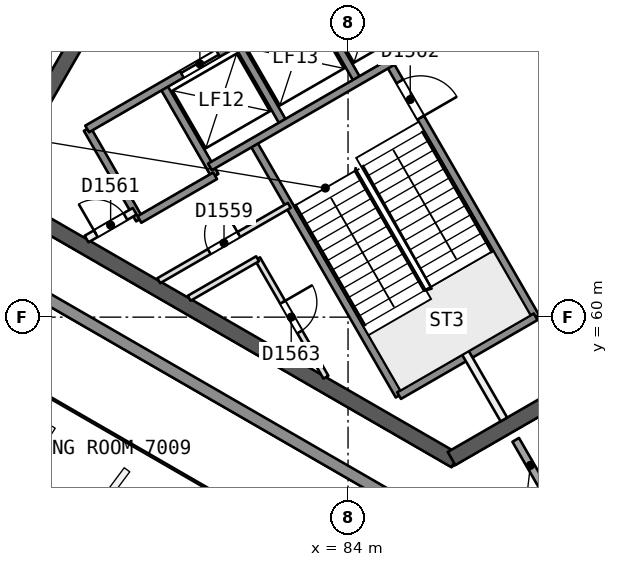
"""IFC4 building model, lengths in metres.
Left out: names, types, materials, properties, quantities, classifications, styles, units other than length and angle.
Written with IfcOpenShell. Run it as: python <this file> out.ifc"""

import sys

from ifc_helpers import new_model, si_unit, direction, frame, frame_2d, origin, place, context, subcontext, project, spatial, rectangle, extrude, element, fill, save


model = new_model("IFC4")
c1 = context("Model", 3, precision=1e-05, world=origin(), true_north=direction((0.0, 1.0)))
c2 = subcontext(c1, "Body", "Model", "MODEL_VIEW")
j1 = project(units=[si_unit("LENGTHUNIT", "METRE"), si_unit("PLANEANGLEUNIT", "RADIAN")], contexts=[c1])
p1 = place(None, origin())
s1 = spatial("IfcSite", under=j1, at=p1, CompositionType="ELEMENT")
p2 = place(p1, origin())
s2 = spatial("IfcBuilding", under=s1, at=p2, CompositionType="ELEMENT")
p3 = place(p2, frame((0.0, 0.0, 284.9)))
s3 = spatial("IfcBuildingStorey", under=s2, at=p3, CompositionType="ELEMENT", Elevation=284.9)
p4 = place(p3, frame((79.615, 72.006, 0.0), z_axis=(0.0, 0.0, 1.0), x_axis=(-0.50000177223, -0.866024380585, 0.0)))
e1 = element("IfcWall", 1, at=p4, inside=s3, PredefinedType="SHEAR", context=c2, shape_type="SweptSolid", body=[
    extrude(rectangle(XDim=10.265, YDim=0.4, at=frame_2d((5.132, 0.0))), origin(), (0.0, 0.0, 1.0), 3.7),
])
p5 = place(p4, frame((0.834, 0.0, 0.0)))
e2 = element("IfcOpeningElement", 2, at=p5, cuts=e1, PredefinedType="OPENING", context=c2, shape_type="SweptSolid", body=[
    extrude(rectangle(XDim=1.2, YDim=2.1, at=frame_2d((0.6, 1.05))), frame((0.0, 0.21, 0.0), z_axis=(0.0, -1.0, 0.0), x_axis=(1.0, 0.0, 0.0)), (0.0, 0.0, 1.0), 0.421),
])
p6 = place(p3, frame((74.583, 63.29, 0.0), z_axis=(0.0, 0.0, 1.0), x_axis=(0.866024494188, -0.500001575463, 0.0)))
e3 = element("IfcWall", 3, at=p6, inside=s3, PredefinedType="SHEAR", context=c2, shape_type="SweptSolid", body=[
    extrude(rectangle(XDim=14.133, YDim=0.4, at=frame_2d((7.067, 0.0))), origin(), (0.0, 0.0, 1.0), 3.7),
])
p7 = place(p3, frame((86.723, 56.281, 0.0), z_axis=(0.0, 0.0, 1.0), x_axis=(0.866025485263, 0.499999858875, 0.0)))
e4 = element("IfcWall", 4, at=p7, inside=s3, PredefinedType="SHEAR", context=c2, shape_type="SweptSolid", body=[
    extrude(rectangle(XDim=3.53, YDim=0.4, at=frame_2d((1.765, 0.0))), origin(), (0.0, 0.0, 1.0), 3.7),
])
p8 = place(p3, frame((88.412, 56.771, 0.0), z_axis=(0.0, 0.0, 1.0), x_axis=(0.500072711917, -0.86598341947, 0.0)))
e5 = element("IfcWall", 5, at=p8, inside=s3, PredefinedType="PARTITIONING", context=c2, shape_type="SweptSolid", body=[
    extrude(rectangle(XDim=1.549, YDim=0.2, at=frame_2d((0.774, 0.0))), origin(), (0.0, 0.0, 1.0), 3.3),
])
p9 = place(p3, frame((91.354, 56.485, 0.0), z_axis=(0.0, 0.0, 1.0), x_axis=(-0.866023315909, -0.500003616288, 0.0)))
e6 = element("IfcWall", 6, at=p9, inside=s3, PredefinedType="SOLIDWALL", context=c2, shape_type="SweptSolid", body=[
    extrude(rectangle(XDim=4.811, YDim=0.3, at=frame_2d((2.405, 0.0))), origin(), (0.0, 0.0, 1.0), 3.3),
])
p10 = place(p9, frame((0.259, 0.0, 0.9)))
e7 = element("IfcOpeningElement", 7, at=p10, cuts=e6, PredefinedType="OPENING", context=c2, shape_type="SweptSolid", body=[
    extrude(rectangle(XDim=1.8, YDim=1.5, at=frame_2d((0.9, 0.75))), frame((0.0, 0.161, 0.0), z_axis=(0.0, -1.0, 0.0), x_axis=(1.0, 0.0, 0.0)), (0.0, 0.0, 1.0), 0.321),
])
p11 = place(p3, frame((87.188, 54.08, 0.0), z_axis=(0.0, 0.0, 1.0), x_axis=(-0.866024534676, 0.500001505337, 0.0)))
e8 = element("IfcWall", 8, at=p11, inside=s3, PredefinedType="SOLIDWALL", context=c2, shape_type="SweptSolid", body=[
    extrude(rectangle(XDim=47.03, YDim=0.3, at=frame_2d((23.515, 0.0))), origin(), (0.0, 0.0, 1.0), 3.3),
])
p12 = place(p11, frame((29.392, 0.0, 0.0)))
e9 = element("IfcOpeningElement", 9, at=p12, cuts=e8, PredefinedType="OPENING", context=c2, shape_type="SweptSolid", body=[
    extrude(rectangle(XDim=2.4, YDim=2.4, at=frame_2d((1.2, 1.2))), frame((0.0, 0.161, 0.0), z_axis=(0.0, -1.0, 0.0), x_axis=(1.0, 0.0, 0.0)), (0.0, 0.0, 1.0), 0.321),
])
p13 = place(p11, frame((26.274, 0.0, 0.0)))
e10 = element("IfcOpeningElement", 10, at=p13, cuts=e8, PredefinedType="OPENING", context=c2, shape_type="SweptSolid", body=[
    extrude(rectangle(XDim=2.4, YDim=2.4, at=frame_2d((1.2, 1.2))), frame((0.0, 0.161, 0.0), z_axis=(0.0, -1.0, 0.0), x_axis=(1.0, 0.0, 0.0)), (0.0, 0.0, 1.0), 0.321),
])
p14 = place(p11, frame((16.859, 0.0, 0.0)))
e11 = element("IfcOpeningElement", 11, at=p14, cuts=e8, PredefinedType="OPENING", context=c2, shape_type="SweptSolid", body=[
    extrude(rectangle(XDim=2.4, YDim=2.4, at=frame_2d((1.2, 1.2))), frame((0.0, 0.161, 0.0), z_axis=(0.0, -1.0, 0.0), x_axis=(1.0, 0.0, 0.0)), (0.0, 0.0, 1.0), 0.321),
])
p15 = place(p11, frame((21.536, 0.0, 0.0)))
e12 = element("IfcOpeningElement", 12, at=p15, cuts=e8, PredefinedType="OPENING", context=c2, shape_type="SweptSolid", body=[
    extrude(rectangle(XDim=2.4, YDim=2.4, at=frame_2d((1.2, 1.2))), frame((0.0, 0.161, 0.0), z_axis=(0.0, -1.0, 0.0), x_axis=(1.0, 0.0, 0.0)), (0.0, 0.0, 1.0), 0.321),
])
p16 = place(p3, frame((77.135, 64.952, 0.0), z_axis=(0.0, 0.0, 1.0), x_axis=(0.499996545922, -0.866027397988, 0.0)))
e13 = element("IfcWall", 13, at=p16, inside=s3, PredefinedType="SOLIDWALL", context=c2, shape_type="SweptSolid", body=[
    extrude(rectangle(XDim=2.75, YDim=0.2, at=frame_2d((1.375, 0.0))), origin(), (0.0, 0.0, 1.0), 3.3),
])
p17 = place(p3, frame((81.619, 61.536, 0.0), z_axis=(0.0, 0.0, 1.0), x_axis=(0.499992664208, -0.866029639064, 0.0)))
e14 = element("IfcWall", 14, at=p17, inside=s3, PredefinedType="PARTITIONING", context=c2, shape_type="SweptSolid", body=[
    extrude(rectangle(XDim=3.598, YDim=0.15, at=frame_2d((1.799, 0.0))), origin(), (0.0, 0.0, 1.0), 3.3),
])
p18 = place(p17, frame((1.322, 0.0, 0.0)))
e15 = element("IfcOpeningElement", 15, at=p18, cuts=e14, PredefinedType="OPENING", context=c2, shape_type="SweptSolid", body=[
    extrude(rectangle(XDim=0.9, YDim=2.1, at=frame_2d((0.45, 1.05))), frame((0.0, 0.085, 0.0), z_axis=(0.0, -1.0, 0.0), x_axis=(1.0, 0.0, 0.0)), (0.0, 0.0, 1.0), 0.171),
])
p19 = place(p3, frame((79.127, 66.102, 0.0), z_axis=(0.0, 0.0, 1.0), x_axis=(0.499996545922, -0.866027397988, 0.0)))
e16 = element("IfcWall", 16, at=p19, inside=s3, PredefinedType="SOLIDWALL", context=c2, shape_type="SweptSolid", body=[
    extrude(rectangle(XDim=2.75, YDim=0.2, at=frame_2d((1.375, 0.0))), origin(), (0.0, 0.0, 1.0), 3.3),
])
p20 = place(p3, frame((81.493, 64.604, 0.0), z_axis=(0.0, 0.0, 1.0), x_axis=(0.500006057782, -0.866021906294, 0.0)))
e17 = element("IfcWall", 17, at=p20, inside=s3, PredefinedType="SOLIDWALL", context=c2, shape_type="SweptSolid", body=[
    extrude(rectangle(XDim=7.7, YDim=0.2, at=frame_2d((3.85, 0.0))), origin(), (0.0, 0.0, 1.0), 3.3),
])
p21 = place(p3, frame((81.076, 67.227, 0.0), z_axis=(0.0, 0.0, 1.0), x_axis=(0.50000366821, -0.866023285932, 0.0)))
e18 = element("IfcWall", 18, at=p21, inside=s3, PredefinedType="SOLIDWALL", context=c2, shape_type="SweptSolid", body=[
    extrude(rectangle(XDim=2.48, YDim=0.2, at=frame_2d((1.24, 0.0))), origin(), (0.0, 0.0, 1.0), 3.3),
])
p22 = place(p3, frame((87.09, 59.06, 0.0), z_axis=(0.0, 0.0, 1.0), x_axis=(0.499941815747, -0.866058993873, 0.0)))
e19 = element("IfcWall", 19, at=p22, inside=s3, PredefinedType="PARTITIONING", context=c2, shape_type="SweptSolid", body=[
    extrude(rectangle(XDim=2.023, YDim=0.2, at=frame_2d((1.012, 0.0))), origin(), (0.0, 0.0, 1.0), 3.3),
])
p23 = place(p3, frame((83.024, 68.352, 0.0), z_axis=(0.0, 0.0, 1.0), x_axis=(0.50000366821, -0.866023285932, 0.0)))
e20 = element("IfcWall", 20, at=p23, inside=s3, PredefinedType="SOLIDWALL", context=c2, shape_type="SweptSolid", body=[
    extrude(rectangle(XDim=2.48, YDim=0.2, at=frame_2d((1.24, 0.0))), origin(), (0.0, 0.0, 1.0), 3.3),
])
p24 = place(p3, frame((85.087, 66.679, 0.0), z_axis=(0.0, 0.0, 1.0), x_axis=(0.500019787375, -0.866013979237, 0.0)))
e21 = element("IfcWall", 21, at=p24, inside=s3, PredefinedType="SOLIDWALL", context=c2, shape_type="SweptSolid", body=[
    extrude(rectangle(XDim=7.7, YDim=0.2, at=frame_2d((3.85, 0.0))), origin(), (0.0, 0.0, 1.0), 3.3),
])
p25 = place(p24, frame((0.55, 0.0, 0.0)))
e22 = element("IfcOpeningElement", 22, at=p25, cuts=e21, PredefinedType="OPENING", context=c2, shape_type="SweptSolid", body=[
    extrude(rectangle(XDim=1.1, YDim=2.1, at=frame_2d((0.55, 1.05))), frame((0.0, 0.11, 0.0), z_axis=(0.0, -1.0, 0.0), x_axis=(1.0, 0.0, 0.0)), (0.0, 0.0, 1.0), 0.221),
])
p26 = place(p3, frame((77.135, 64.952, 0.0), z_axis=(0.0, 0.0, 1.0), x_axis=(0.866031916153, 0.499988720078, 0.0)))
e23 = element("IfcWall", 23, at=p26, inside=s3, PredefinedType="SOLIDWALL", context=c2, shape_type="SweptSolid", body=[
    extrude(rectangle(XDim=11.35, YDim=0.2, at=frame_2d((5.675, 0.0))), origin(), (0.0, 0.0, 1.0), 3.3),
])
p27 = place(p26, frame((2.875, 0.0, 0.0)))
e24 = element("IfcOpeningElement", 24, at=p27, cuts=e23, PredefinedType="OPENING", context=c2, shape_type="SweptSolid", body=[
    extrude(rectangle(XDim=1.1, YDim=2.1, at=frame_2d((0.55, 1.05))), frame((0.0, 0.11, 0.0), z_axis=(0.0, -1.0, 0.0), x_axis=(1.0, 0.0, 0.0)), (0.0, 0.0, 1.0), 0.221),
])
p28 = place(p26, frame((5.125, 0.0, 0.0)))
e25 = element("IfcOpeningElement", 25, at=p28, cuts=e23, PredefinedType="OPENING", context=c2, shape_type="SweptSolid", body=[
    extrude(rectangle(XDim=1.1, YDim=2.1, at=frame_2d((0.55, 1.05))), frame((0.0, 0.11, 0.0), z_axis=(0.0, -1.0, 0.0), x_axis=(1.0, 0.0, 0.0)), (0.0, 0.0, 1.0), 0.221),
])
p29 = place(p26, frame((7.375, 0.0, 0.0)))
e26 = element("IfcOpeningElement", 26, at=p29, cuts=e23, PredefinedType="OPENING", context=c2, shape_type="SweptSolid", body=[
    extrude(rectangle(XDim=1.1, YDim=2.1, at=frame_2d((0.55, 1.05))), frame((0.0, 0.11, 0.0), z_axis=(0.0, -1.0, 0.0), x_axis=(1.0, 0.0, 0.0)), (0.0, 0.0, 1.0), 0.221),
])
p30 = place(p3, frame((80.367, 63.954, 0.0), z_axis=(0.0, 0.0, 1.0), x_axis=(0.866026575979, 0.499997969693, 0.0)))
e27 = element("IfcWall", 27, at=p30, inside=s3, PredefinedType="SOLIDWALL", context=c2, shape_type="SweptSolid", body=[
    extrude(rectangle(XDim=6.75, YDim=0.2, at=frame_2d((3.375, 0.0))), origin(), (0.0, 0.0, 1.0), 3.3),
])
p31 = place(p3, frame((77.12, 62.056, 0.0), z_axis=(0.0, 0.0, 1.0), x_axis=(0.866054810376, 0.49994906283, 0.0)))
e28 = element("IfcWall", 28, at=p31, inside=s3, PredefinedType="PARTITIONING", context=c2, shape_type="SweptSolid", body=[
    extrude(rectangle(XDim=1.461, YDim=0.2, at=frame_2d((0.73, 0.0))), origin(), (0.0, 0.0, 1.0), 3.3),
])
p32 = place(p31, frame((0.281, 0.0, 0.0)))
e29 = element("IfcOpeningElement", 29, at=p32, cuts=e28, PredefinedType="OPENING", context=c2, shape_type="SweptSolid", body=[
    extrude(rectangle(XDim=0.9, YDim=2.1, at=frame_2d((0.45, 1.05))), frame((0.0, 0.11, 0.0), z_axis=(0.0, -1.0, 0.0), x_axis=(1.0, 0.0, 0.0)), (0.0, 0.0, 1.0), 0.221),
])
p33 = place(p3, frame((78.51, 62.57, 0.0), z_axis=(0.0, 0.0, 1.0), x_axis=(0.866053019151, 0.499952165731, 0.0)))
e30 = element("IfcWall", 30, at=p33, inside=s3, PredefinedType="SOLIDWALL", context=c2, shape_type="SweptSolid", body=[
    extrude(rectangle(XDim=2.3, YDim=0.2, at=frame_2d((1.15, 0.0))), origin(), (0.0, 0.0, 1.0), 3.3),
])
p34 = place(p3, frame((79.02, 60.959, 0.0), z_axis=(0.0, 0.0, 1.0), x_axis=(0.866028661061, 0.499994358189, 0.0)))
e31 = element("IfcWall", 31, at=p34, inside=s3, PredefinedType="PARTITIONING", context=c2, shape_type="SweptSolid", body=[
    extrude(rectangle(XDim=3.964, YDim=0.15, at=frame_2d((1.982, 0.0))), origin(), (0.0, 0.0, 1.0), 3.3),
])
p35 = place(p34, frame((1.532, 0.0, 0.0)))
e32 = element("IfcOpeningElement", 32, at=p35, cuts=e31, PredefinedType="OPENING", context=c2, shape_type="SweptSolid", body=[
    extrude(rectangle(XDim=0.9, YDim=2.1, at=frame_2d((0.45, 1.05))), frame((0.0, 0.085, 0.0), z_axis=(0.0, -1.0, 0.0), x_axis=(1.0, 0.0, 0.0)), (0.0, 0.0, 1.0), 0.171),
])
p36 = place(p3, frame((79.82, 60.497, 0.0), z_axis=(0.0, 0.0, 1.0), x_axis=(0.866021168401, 0.500007335828, 0.0)))
e33 = element("IfcWall", 33, at=p36, inside=s3, PredefinedType="PARTITIONING", context=c2, shape_type="SweptSolid", body=[
    extrude(rectangle(XDim=2.077, YDim=0.15, at=frame_2d((1.039, 0.0))), origin(), (0.0, 0.0, 1.0), 3.3),
])
p37 = place(p3, frame((85.343, 57.935, 0.0), z_axis=(0.0, 0.0, 1.0), x_axis=(0.866004344652, 0.500036473714, 0.0)))
e34 = element("IfcWall", 34, at=p37, inside=s3, PredefinedType="SOLIDWALL", context=c2, shape_type="SweptSolid", body=[
    extrude(rectangle(XDim=4.15, YDim=0.2, at=frame_2d((2.075, 0.0))), origin(), (0.0, 0.0, 1.0), 3.3),
])
p38 = place(p27, origin())
e35 = element("IfcDoor", 35, at=p38, inside=s3, OperationType="SLIDING_TO_LEFT", PredefinedType="NOTDEFINED", context=c2, shape_type="SweptSolid", body=[
    extrude(rectangle(XDim=1.1, YDim=2.1, at=frame_2d((0.55, 1.05))), frame((0.0, 0.025, 0.0), z_axis=(0.0, -1.0, 0.0), x_axis=(1.0, 0.0, 0.0)), (0.0, 0.0, 1.0), 0.05),
])
fill(e24, e35)
p39 = place(p35, origin())
e36 = element("IfcDoor", 36, at=p39, inside=s3, OperationType="SINGLE_SWING_RIGHT", PredefinedType="NOTDEFINED", context=c2, shape_type="SweptSolid", body=[
    extrude(rectangle(XDim=0.9, YDim=2.1, at=frame_2d((0.45, 1.05))), frame((0.0, 0.025, 0.0), z_axis=(0.0, -1.0, 0.0), x_axis=(1.0, 0.0, 0.0)), (0.0, 0.0, 1.0), 0.05),
])
fill(e32, e36)
p40 = place(p32, origin())
e37 = element("IfcDoor", 37, at=p40, inside=s3, OperationType="SINGLE_SWING_LEFT", PredefinedType="NOTDEFINED", context=c2, shape_type="SweptSolid", body=[
    extrude(rectangle(XDim=0.9, YDim=2.1, at=frame_2d((0.45, 1.05))), frame((0.0, 0.025, 0.0), z_axis=(0.0, -1.0, 0.0), x_axis=(1.0, 0.0, 0.0)), (0.0, 0.0, 1.0), 0.05),
])
fill(e29, e37)
p41 = place(p25, origin())
e38 = element("IfcDoor", 38, at=p41, inside=s3, OperationType="SINGLE_SWING_RIGHT", PredefinedType="NOTDEFINED", context=c2, shape_type="SweptSolid", body=[
    extrude(rectangle(XDim=1.1, YDim=2.1, at=frame_2d((0.55, 1.05))), frame((0.0, 0.025, 0.0), z_axis=(0.0, -1.0, 0.0), x_axis=(1.0, 0.0, 0.0)), (0.0, 0.0, 1.0), 0.05),
])
fill(e22, e38)
p42 = place(p18, origin())
e39 = element("IfcDoor", 39, at=p42, inside=s3, OperationType="SINGLE_SWING_LEFT", PredefinedType="NOTDEFINED", context=c2, shape_type="SweptSolid", body=[
    extrude(rectangle(XDim=0.9, YDim=2.1, at=frame_2d((0.45, 1.05))), frame((0.0, 0.025, 0.0), z_axis=(0.0, -1.0, 0.0), x_axis=(1.0, 0.0, 0.0)), (0.0, 0.0, 1.0), 0.05),
])
fill(e15, e39)
save(model, sys.argv[1])
